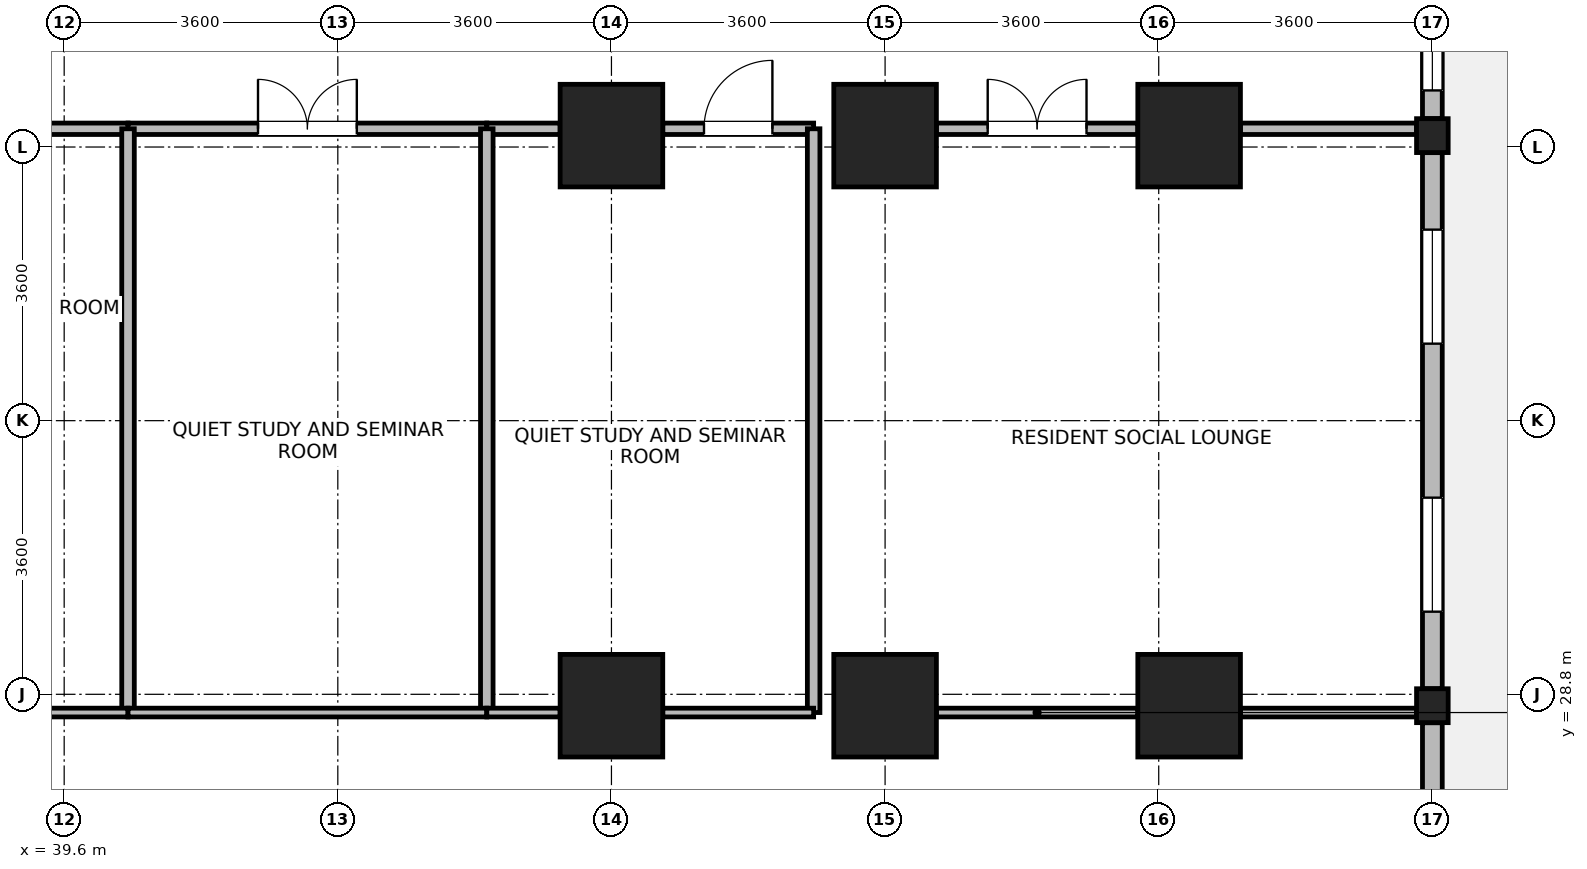
"""IFC4 building model, lengths in metres.
Left out: names, types, materials, properties, quantities, classifications, styles, units other than length and angle.
Written with IfcOpenShell. Run it as: python <this file> out.ifc"""

import sys

from ifc_helpers import new_model, si_unit, direction, frame, frame_2d, origin, origin_2d, place, context, subcontext, project, spatial, rectangle, i_section, extrude, source, transform, mapped, element, fill, save


model = new_model("IFC4")
c1 = context("Model", 3, precision=1e-05, world=origin(), true_north=direction((0.0, 1.0)))
c2 = subcontext(c1, "Body", "Model", "MODEL_VIEW")
j1 = project(units=[si_unit("LENGTHUNIT", "METRE"), si_unit("PLANEANGLEUNIT", "RADIAN")], contexts=[c1])
p1 = place(None, origin())
s1 = spatial("IfcSite", under=j1, at=p1, CompositionType="ELEMENT")
p2 = place(p1, origin())
s2 = spatial("IfcBuilding", under=s1, at=p2, CompositionType="ELEMENT")
p3 = place(p2, frame((0.0, 0.0, 58.6)))
s3 = spatial("IfcBuildingStorey", under=s2, at=p3, CompositionType="ELEMENT", Elevation=58.6)
m1 = source(origin(), c2, "Body", "SweptSolid", [
    extrude(rectangle(XDim=1.35, YDim=1.35, at=origin_2d()), origin(), (0.0, 0.0, 1.0), 3.7),
])
for number, where, z_axis, x_axis in (
    (1, (46.8, 28.65, 0.0), (0.0, 0.0, 1.0), (1.0, 0.0, 0.0)),
    (2, (46.8, 36.15, 0.0), (0.0, 0.0, 1.0), (1.0, 0.0, 0.0)),
    (3, (50.4, 28.65, 0.0), (0.0, 0.0, 1.0), (1.0, 0.0, 0.0)),
    (4, (50.4, 36.15, 0.0), (0.0, 0.0, 1.0), (1.0, 0.0, 0.0)),
    (5, (54.4, 28.65, 0.0), (0.0, 0.0, 1.0), (1.0, 0.0, 0.0)),
    (6, (54.4, 36.15, 0.0), (0.0, 0.0, 1.0), (1.0, 0.0, 0.0)),
):
    element("IfcColumn", number, at=place(p3, frame(where, z_axis=z_axis, x_axis=x_axis)), inside=s3, PredefinedType="COLUMN", context=c2, shape_type="MappedRepresentation", body=[
        mapped(m1, transform((0.0, 0.0, 0.0), x_axis=(1.0, 0.0, 0.0), y_axis=(0.0, 1.0, 0.0), z_axis=(0.0, 0.0, 1.0), scale=1.0)),
    ])
m2 = source(origin(), c2, "Body", "SweptSolid", [
    extrude(i_section(OverallWidth=0.416, OverallDepth=0.446, WebThickness=0.029, FlangeThickness=0.04, FilletRadius=0.015, at=origin_2d()), origin(), (0.0, 0.0, 1.0), 3.7),
])
for number, where, z_axis, x_axis in (
    (7, (57.6, 28.65, 0.0), (0.0, 0.0, 1.0), (1.0, 0.0, 0.0)),
    (8, (57.6, 36.15, 0.0), (0.0, 0.0, 1.0), (1.0, 0.0, 0.0)),
):
    element("IfcColumn", number, at=place(p3, frame(where, z_axis=z_axis, x_axis=x_axis)), inside=s3, PredefinedType="COLUMN", context=c2, shape_type="MappedRepresentation", body=[
        mapped(m2, transform((0.0, 0.0, 0.0), x_axis=(1.0, 0.0, 0.0), y_axis=(0.0, 1.0, 0.0), z_axis=(0.0, 0.0, 1.0), scale=1.0)),
    ])
p4 = place(p3, frame((57.6, 28.426, 0.0), z_axis=(0.0, 0.0, 1.0), x_axis=(0.0, -1.0, 0.0)))
e9 = element("IfcWall", 9, at=p4, inside=s3, PredefinedType="STANDARD", context=c2, shape_type="SweptSolid", body=[
    extrude(rectangle(XDim=6.602, YDim=0.26, at=frame_2d((3.301, 0.0))), origin(), (0.0, 0.0, 1.0), 2.93),
])
p5 = place(p4, frame((4.201, 0.0, 0.85)))
e10 = element("IfcOpeningElement", 10, at=p5, cuts=e9, PredefinedType="OPENING", context=c2, shape_type="SweptSolid", body=[
    extrude(rectangle(XDim=1.5, YDim=1.85, at=frame_2d((0.75, 0.925))), frame((0.0, 0.14, 0.0), z_axis=(0.0, -1.0, 0.0), x_axis=(1.0, 0.0, 0.0)), (0.0, 0.0, 1.0), 0.28),
])
p6 = place(p4, frame((2.826, 0.0, 0.85)))
e11 = element("IfcOpeningElement", 11, at=p6, cuts=e9, PredefinedType="OPENING", context=c2, shape_type="SweptSolid", body=[
    extrude(rectangle(XDim=0.95, YDim=1.75, at=frame_2d((0.475, 0.875))), frame((0.0, 0.14, 0.0), z_axis=(0.0, -1.0, 0.0), x_axis=(1.0, 0.0, 0.0)), (0.0, 0.0, 1.0), 0.28),
])
p7 = place(p3, frame((57.6, 35.926, 0.0), z_axis=(0.0, 0.0, 1.0), x_axis=(0.0, -1.0, 0.0)))
e12 = element("IfcWall", 12, at=p7, inside=s3, PredefinedType="STANDARD", context=c2, shape_type="SweptSolid", body=[
    extrude(rectangle(XDim=7.052, YDim=0.26, at=frame_2d((3.526, 0.0))), origin(), (0.0, 0.0, 1.0), 2.93),
])
p8 = place(p7, frame((1.013, 0.0, 0.85)))
e13 = element("IfcOpeningElement", 13, at=p8, cuts=e12, PredefinedType="OPENING", context=c2, shape_type="SweptSolid", body=[
    extrude(rectangle(XDim=1.5, YDim=1.85, at=frame_2d((0.75, 0.925))), frame((0.0, 0.14, 0.0), z_axis=(0.0, -1.0, 0.0), x_axis=(1.0, 0.0, 0.0)), (0.0, 0.0, 1.0), 0.28),
])
p9 = place(p7, frame((4.539, 0.0, 0.85)))
e14 = element("IfcOpeningElement", 14, at=p9, cuts=e12, PredefinedType="OPENING", context=c2, shape_type="SweptSolid", body=[
    extrude(rectangle(XDim=1.5, YDim=1.85, at=frame_2d((0.75, 0.925))), frame((0.0, 0.14, 0.0), z_axis=(0.0, -1.0, 0.0), x_axis=(1.0, 0.0, 0.0)), (0.0, 0.0, 1.0), 0.28),
])
p10 = place(p3, frame((57.6, 39.73, 0.0), z_axis=(0.0, 0.0, 1.0), x_axis=(0.0, -1.0, 0.0)))
e15 = element("IfcWall", 15, at=p10, inside=s3, PredefinedType="STANDARD", context=c2, shape_type="SweptSolid", body=[
    extrude(rectangle(XDim=3.356, YDim=0.26, at=frame_2d((1.678, 0.0))), origin(), (0.0, 0.0, 1.0), 3.43),
])
p11 = place(p10, frame((2.035, 0.0, 0.85)))
e16 = element("IfcOpeningElement", 16, at=p11, cuts=e15, PredefinedType="OPENING", context=c2, shape_type="SweptSolid", body=[
    extrude(rectangle(XDim=0.95, YDim=1.75, at=frame_2d((0.475, 0.875))), frame((0.0, 0.14, 0.0), z_axis=(0.0, -1.0, 0.0), x_axis=(1.0, 0.0, 0.0)), (0.0, 0.0, 1.0), 0.28),
])
p12 = place(p10, frame((0.263, 0.0, 0.85)))
e17 = element("IfcOpeningElement", 17, at=p12, cuts=e15, PredefinedType="OPENING", context=c2, shape_type="SweptSolid", body=[
    extrude(rectangle(XDim=0.95, YDim=1.75, at=frame_2d((0.475, 0.875))), frame((0.0, 0.14, 0.0), z_axis=(0.0, -1.0, 0.0), x_axis=(1.0, 0.0, 0.0)), (0.0, 0.0, 1.0), 0.28),
])
p13 = place(p3, frame((51.075, 36.24, 0.0), z_axis=(0.0, 0.0, 1.0), x_axis=(1.0, 0.0, 0.0)))
e18 = element("IfcWall", 18, at=p13, inside=s3, PredefinedType="PARTITIONING", context=c2, shape_type="SweptSolid", body=[
    extrude(rectangle(XDim=2.65, YDim=0.15, at=frame_2d((1.325, 0.0))), origin(), (0.0, 0.0, 1.0), 2.78),
])
p14 = place(p13, frame((0.675, 0.0, 0.0)))
e19 = element("IfcOpeningElement", 19, at=p14, cuts=e18, PredefinedType="OPENING", context=c2, shape_type="SweptSolid", body=[
    extrude(rectangle(XDim=1.3, YDim=2.12, at=frame_2d((0.65, 1.06))), frame((0.0, 0.085, 0.0), z_axis=(0.0, -1.0, 0.0), x_axis=(1.0, 0.0, 0.0)), (0.0, 0.0, 1.0), 0.17),
])
p15 = place(p3, frame((55.075, 36.24, 0.0), z_axis=(0.0, 0.0, 1.0), x_axis=(1.0, 0.0, 0.0)))
e20 = element("IfcWall", 20, at=p15, inside=s3, PredefinedType="PARTITIONING", context=c2, shape_type="SweptSolid", body=[
    extrude(rectangle(XDim=2.317, YDim=0.15, at=frame_2d((1.159, 0.0))), origin(), (0.0, 0.0, 1.0), 2.78),
])
p16 = place(p3, frame((36.675, 36.24, 0.0), z_axis=(0.0, 0.0, 1.0), x_axis=(1.0, 0.0, 0.0)))
e21 = element("IfcWall", 21, at=p16, inside=s3, PredefinedType="PARTITIONING", context=c2, shape_type="SweptSolid", body=[
    extrude(rectangle(XDim=3.765, YDim=0.15, at=frame_2d((1.882, 0.0))), origin(), (0.0, 0.0, 1.0), 2.78),
])
p17 = place(p3, frame((40.44, 36.24, 0.0), z_axis=(0.0, 0.0, 1.0), x_axis=(1.0, 0.0, 0.0)))
e22 = element("IfcWall", 22, at=p17, inside=s3, PredefinedType="PARTITIONING", context=c2, shape_type="SweptSolid", body=[
    extrude(rectangle(XDim=4.72, YDim=0.15, at=frame_2d((2.36, 0.0))), origin(), (0.0, 0.0, 1.0), 2.78),
])
p18 = place(p17, frame((1.71, 0.0, 0.0)))
e23 = element("IfcOpeningElement", 23, at=p18, cuts=e22, PredefinedType="OPENING", context=c2, shape_type="SweptSolid", body=[
    extrude(rectangle(XDim=1.3, YDim=2.12, at=frame_2d((0.65, 1.06))), frame((0.0, 0.085, 0.0), z_axis=(0.0, -1.0, 0.0), x_axis=(1.0, 0.0, 0.0)), (0.0, 0.0, 1.0), 0.17),
])
p19 = place(p3, frame((45.16, 36.24, 0.0), z_axis=(0.0, 0.0, 1.0), x_axis=(1.0, 0.0, 0.0)))
e24 = element("IfcWall", 24, at=p19, inside=s3, PredefinedType="PARTITIONING", context=c2, shape_type="SweptSolid", body=[
    extrude(rectangle(XDim=0.965, YDim=0.15, at=frame_2d((0.482, 0.0))), origin(), (0.0, 0.0, 1.0), 2.78),
])
p20 = place(p3, frame((47.475, 36.24, 0.0), z_axis=(0.0, 0.0, 1.0), x_axis=(1.0, 0.0, 0.0)))
e25 = element("IfcWall", 25, at=p20, inside=s3, PredefinedType="PARTITIONING", context=c2, shape_type="SweptSolid", body=[
    extrude(rectangle(XDim=1.985, YDim=0.15, at=frame_2d((0.992, 0.0))), origin(), (0.0, 0.0, 1.0), 2.78),
])
p21 = place(p20, frame((0.542, 0.0, 0.0)))
e26 = element("IfcOpeningElement", 26, at=p21, cuts=e25, PredefinedType="OPENING", context=c2, shape_type="SweptSolid", body=[
    extrude(rectangle(XDim=0.9, YDim=2.08, at=frame_2d((0.45, 1.04))), frame((0.0, 0.085, 0.0), z_axis=(0.0, -1.0, 0.0), x_axis=(1.0, 0.0, 0.0)), (0.0, 0.0, 1.0), 0.17),
])
p22 = place(p3, frame((51.075, 28.56, 0.0), z_axis=(0.0, 0.0, 1.0), x_axis=(1.0, 0.0, 0.0)))
e27 = element("IfcWall", 27, at=p22, inside=s3, PredefinedType="PARTITIONING", context=c2, shape_type="SweptSolid", body=[
    extrude(rectangle(XDim=2.65, YDim=0.115, at=frame_2d((1.325, 0.0))), origin(), (0.0, 0.0, 1.0), 2.78),
])
p23 = place(p3, frame((55.075, 28.56, 0.0), z_axis=(0.0, 0.0, 1.0), x_axis=(1.0, 0.0, 0.0)))
e28 = element("IfcWall", 28, at=p23, inside=s3, PredefinedType="PARTITIONING", context=c2, shape_type="SweptSolid", body=[
    extrude(rectangle(XDim=2.317, YDim=0.115, at=frame_2d((1.159, 0.0))), origin(), (0.0, 0.0, 1.0), 2.78),
])
for number, where, z_axis, x_axis in (
    (29, (40.44, 28.56, 0.0), (0.0, 0.0, 1.0), (0.0, 1.0, 0.0)),
    (30, (45.16, 28.56, 0.0), (0.0, 0.0, 1.0), (0.0, 1.0, 0.0)),
    (31, (49.46, 28.56, 0.0), (0.0, 0.0, 1.0), (0.0, 1.0, 0.0)),
):
    element("IfcWall", number, at=place(p3, frame(where, z_axis=z_axis, x_axis=x_axis)), inside=s3, PredefinedType="PARTITIONING", context=c2, shape_type="SweptSolid", body=[
        extrude(rectangle(XDim=7.68, YDim=0.165, at=frame_2d((3.84, 0.0))), origin(), (0.0, 0.0, 1.0), 3.43),
    ])
p24 = place(p3, frame((36.675, 28.56, 0.0), z_axis=(0.0, 0.0, 1.0), x_axis=(1.0, 0.0, 0.0)))
e32 = element("IfcWall", 32, at=p24, inside=s3, PredefinedType="PARTITIONING", context=c2, shape_type="SweptSolid", body=[
    extrude(rectangle(XDim=3.765, YDim=0.115, at=frame_2d((1.882, 0.0))), origin(), (0.0, 0.0, 1.0), 2.78),
])
p25 = place(p3, frame((40.44, 28.56, 0.0), z_axis=(0.0, 0.0, 1.0), x_axis=(1.0, 0.0, 0.0)))
e33 = element("IfcWall", 33, at=p25, inside=s3, PredefinedType="PARTITIONING", context=c2, shape_type="SweptSolid", body=[
    extrude(rectangle(XDim=4.72, YDim=0.115, at=frame_2d((2.36, 0.0))), origin(), (0.0, 0.0, 1.0), 2.78),
])
p26 = place(p3, frame((45.16, 28.56, 0.0), z_axis=(0.0, 0.0, 1.0), x_axis=(1.0, 0.0, 0.0)))
e34 = element("IfcWall", 34, at=p26, inside=s3, PredefinedType="PARTITIONING", context=c2, shape_type="SweptSolid", body=[
    extrude(rectangle(XDim=0.965, YDim=0.115, at=frame_2d((0.482, 0.0))), origin(), (0.0, 0.0, 1.0), 2.78),
])
p27 = place(p3, frame((47.475, 28.56, 0.0), z_axis=(0.0, 0.0, 1.0), x_axis=(1.0, 0.0, 0.0)))
e35 = element("IfcWall", 35, at=p27, inside=s3, PredefinedType="PARTITIONING", context=c2, shape_type="SweptSolid", body=[
    extrude(rectangle(XDim=1.985, YDim=0.115, at=frame_2d((0.992, 0.0))), origin(), (0.0, 0.0, 1.0), 2.78),
])
p28 = place(p8, origin())
e36 = element("IfcWindow", 36, at=p28, inside=s3, PartitioningType="SINGLE_PANEL", PredefinedType="WINDOW", context=c2, shape_type="SweptSolid", body=[
    extrude(rectangle(XDim=1.5, YDim=1.85, at=frame_2d((0.75, 0.925))), frame((0.0, 0.03, 0.0), z_axis=(0.0, -1.0, 0.0), x_axis=(1.0, 0.0, 0.0)), (0.0, 0.0, 1.0), 0.06),
])
fill(e13, e36)
p29 = place(p9, origin())
e37 = element("IfcWindow", 37, at=p29, inside=s3, PartitioningType="SINGLE_PANEL", PredefinedType="WINDOW", context=c2, shape_type="SweptSolid", body=[
    extrude(rectangle(XDim=1.5, YDim=1.85, at=frame_2d((0.75, 0.925))), frame((0.0, 0.03, 0.0), z_axis=(0.0, -1.0, 0.0), x_axis=(1.0, 0.0, 0.0)), (0.0, 0.0, 1.0), 0.06),
])
fill(e14, e37)
p30 = place(p11, origin())
e38 = element("IfcWindow", 38, at=p30, inside=s3, PartitioningType="SINGLE_PANEL", PredefinedType="WINDOW", context=c2, shape_type="SweptSolid", body=[
    extrude(rectangle(XDim=0.95, YDim=1.75, at=frame_2d((0.475, 0.875))), frame((0.0, 0.03, 0.0), z_axis=(0.0, -1.0, 0.0), x_axis=(1.0, 0.0, 0.0)), (0.0, 0.0, 1.0), 0.06),
])
fill(e16, e38)
p31 = place(p14, origin())
e39 = element("IfcDoor", 39, at=p31, inside=s3, OperationType="DOUBLE_DOOR_SINGLE_SWING", PredefinedType="DOOR", context=c2, shape_type="SweptSolid", body=[
    extrude(rectangle(XDim=1.3, YDim=2.12, at=frame_2d((0.65, 1.06))), frame((0.0, 0.025, 0.0), z_axis=(0.0, -1.0, 0.0), x_axis=(1.0, 0.0, 0.0)), (0.0, 0.0, 1.0), 0.05),
])
fill(e19, e39)
p32 = place(p18, origin())
e40 = element("IfcDoor", 40, at=p32, inside=s3, OperationType="DOUBLE_DOOR_SINGLE_SWING", PredefinedType="DOOR", context=c2, shape_type="SweptSolid", body=[
    extrude(rectangle(XDim=1.3, YDim=2.12, at=frame_2d((0.65, 1.06))), frame((0.0, 0.025, 0.0), z_axis=(0.0, -1.0, 0.0), x_axis=(1.0, 0.0, 0.0)), (0.0, 0.0, 1.0), 0.05),
])
fill(e23, e40)
p33 = place(p21, origin())
e41 = element("IfcDoor", 41, at=p33, inside=s3, OperationType="SINGLE_SWING_RIGHT", PredefinedType="DOOR", context=c2, shape_type="SweptSolid", body=[
    extrude(rectangle(XDim=0.9, YDim=2.08, at=frame_2d((0.45, 1.04))), frame((0.0, 0.025, 0.0), z_axis=(0.0, -1.0, 0.0), x_axis=(1.0, 0.0, 0.0)), (0.0, 0.0, 1.0), 0.05),
])
fill(e26, e41)
save(model, sys.argv[1])
